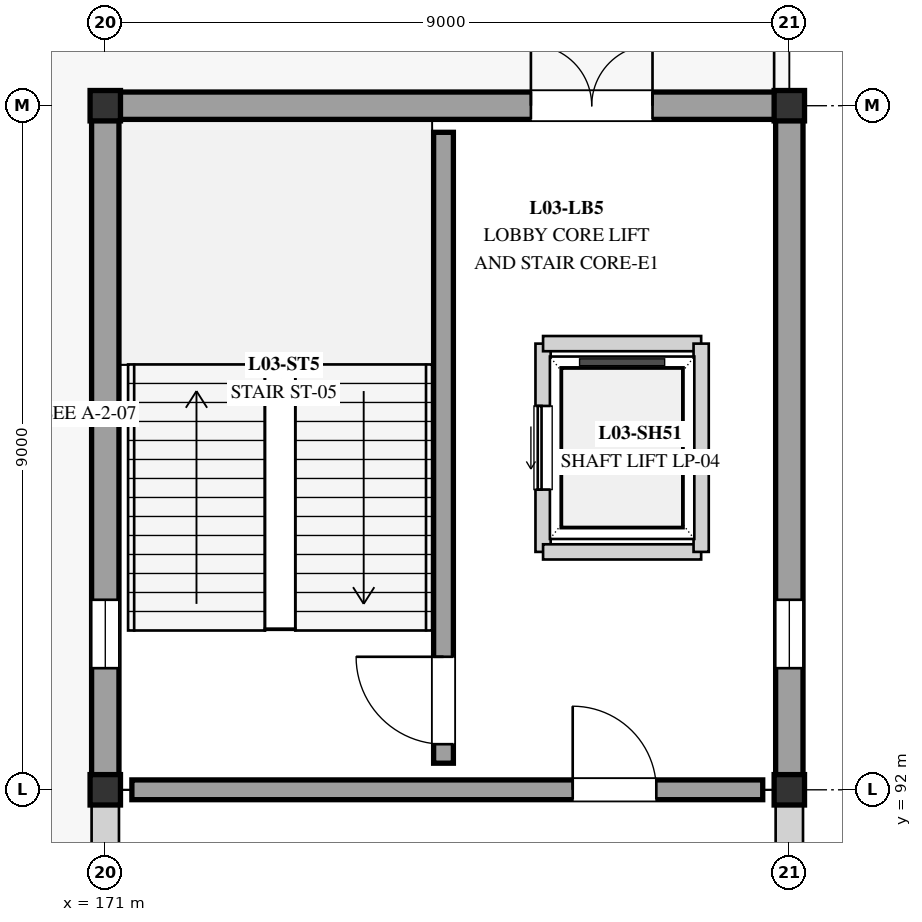
"""IFC4 building model, lengths in metres.
Left out: names, types, materials, properties, quantities, classifications, styles, units other than length and angle.
Written with IfcOpenShell. Run it as: python <this file> out.ifc"""

import sys

from ifc_helpers import new_model, si_unit, direction, frame, frame_2d, origin, origin_2d, place, context, subcontext, project, spatial, rectangle, extrude, element, fill, save


model = new_model("IFC4")
c1 = context("Model", 3, precision=1e-05, world=origin(), true_north=direction((0.0, 1.0)))
c2 = subcontext(c1, "Body", "Model", "MODEL_VIEW")
j1 = project(units=[si_unit("LENGTHUNIT", "METRE"), si_unit("PLANEANGLEUNIT", "RADIAN")], contexts=[c1])
p1 = place(None, origin())
s1 = spatial("IfcSite", under=j1, at=p1, CompositionType="ELEMENT")
p2 = place(p1, origin())
s2 = spatial("IfcBuilding", under=s1, at=p2, CompositionType="ELEMENT")
p3 = place(p2, frame((0.0, 0.0, 12.0)))
s3 = spatial("IfcBuildingStorey", under=s2, at=p3, CompositionType="ELEMENT", Elevation=12.0)
for number, where, z_axis, x_axis in (
    (1, (171.0, 92.0, 0.0), (0.0, 0.0, 1.0), (1.0, 0.0, 0.0)),
    (2, (171.0, 101.0, 0.0), (0.0, 0.0, 1.0), (1.0, 0.0, 0.0)),
    (3, (180.0, 92.0, 0.0), (0.0, 0.0, 1.0), (1.0, 0.0, 0.0)),
    (4, (180.0, 101.0, 0.0), (0.0, 0.0, 1.0), (1.0, 0.0, 0.0)),
):
    element("IfcColumn", number, at=place(p3, frame(where, z_axis=z_axis, x_axis=x_axis)), inside=s3, PredefinedType="COLUMN", context=c2, shape_type="SweptSolid", body=[
        extrude(rectangle(XDim=0.4, YDim=0.4, at=origin_2d()), origin(), (0.0, 0.0, 1.0), 4.65),
    ])
p4 = place(p3, frame((171.0, 83.0, 0.0), z_axis=(0.0, 0.0, 1.0), x_axis=(0.0, 1.0, 0.0)))
e5 = element("IfcWall", 5, at=p4, inside=s3, PredefinedType="STANDARD", context=c2, shape_type="SweptSolid", body=[
    extrude(rectangle(XDim=9.0, YDim=0.36, at=frame_2d((4.5, 0.0))), origin(), (0.0, 0.0, 1.0), 3.1),
])
p5 = place(p4, frame((3.7, 0.0, 0.0)))
e6 = element("IfcOpeningElement", 6, at=p5, cuts=e5, PredefinedType="OPENING", context=c2, shape_type="SweptSolid", body=[
    extrude(rectangle(XDim=1.6, YDim=2.3, at=frame_2d((0.8, 1.15))), frame((0.0, 0.19, 0.0), z_axis=(0.0, -1.0, 0.0), x_axis=(1.0, 0.0, 0.0)), (0.0, 0.0, 1.0), 0.38),
])
p6 = place(p3, frame((180.0, 83.0, 0.0), z_axis=(0.0, 0.0, 1.0), x_axis=(0.0, 1.0, 0.0)))
e7 = element("IfcWall", 7, at=p6, inside=s3, PredefinedType="STANDARD", context=c2, shape_type="SweptSolid", body=[
    extrude(rectangle(XDim=9.0, YDim=0.36, at=frame_2d((4.5, 0.0))), origin(), (0.0, 0.0, 1.0), 3.1),
])
p7 = place(p6, frame((3.45, 0.0, 0.72)))
e8 = element("IfcOpeningElement", 8, at=p7, cuts=e7, PredefinedType="OPENING", context=c2, shape_type="SweptSolid", body=[
    extrude(rectangle(XDim=2.1, YDim=2.2, at=frame_2d((1.05, 1.1))), frame((0.0, 0.19, 0.0), z_axis=(0.0, -1.0, 0.0), x_axis=(1.0, 0.0, 0.0)), (0.0, 0.0, 1.0), 0.38),
])
p8 = place(p3, frame((171.0, 101.0, 0.0), z_axis=(0.0, 0.0, 1.0), x_axis=(1.0, 0.0, 0.0)))
e9 = element("IfcWall", 9, at=p8, inside=s3, PredefinedType="STANDARD", context=c2, shape_type="SweptSolid", body=[
    extrude(rectangle(XDim=9.0, YDim=0.36, at=frame_2d((4.5, 0.0))), origin(), (0.0, 0.0, 1.0), 4.37),
])
p9 = place(p8, frame((5.6, 0.0, 0.0)))
e10 = element("IfcOpeningElement", 10, at=p9, cuts=e9, PredefinedType="OPENING", context=c2, shape_type="SweptSolid", body=[
    extrude(rectangle(XDim=1.6, YDim=2.3, at=frame_2d((0.8, 1.15))), frame((0.0, 0.19, 0.0), z_axis=(0.0, -1.0, 0.0), x_axis=(1.0, 0.0, 0.0)), (0.0, 0.0, 1.0), 0.38),
])
p10 = place(p3, frame((171.0, 92.0, 0.0), z_axis=(0.0, 0.0, 1.0), x_axis=(0.0, 1.0, 0.0)))
e11 = element("IfcWall", 11, at=p10, inside=s3, PredefinedType="STANDARD", context=c2, shape_type="SweptSolid", body=[
    extrude(rectangle(XDim=9.0, YDim=0.36, at=frame_2d((4.5, 0.0))), origin(), (0.0, 0.0, 1.0), 4.37),
])
p11 = place(p10, frame((1.6, 0.0, 0.85)))
e12 = element("IfcOpeningElement", 12, at=p11, cuts=e11, PredefinedType="OPENING", context=c2, shape_type="SweptSolid", body=[
    extrude(rectangle(XDim=0.9, YDim=2.4, at=frame_2d((0.45, 1.2))), frame((0.0, 0.19, 0.0), z_axis=(0.0, -1.0, 0.0), x_axis=(1.0, 0.0, 0.0)), (0.0, 0.0, 1.0), 0.38),
])
p12 = place(p3, frame((180.0, 92.0, 0.0), z_axis=(0.0, 0.0, 1.0), x_axis=(0.0, 1.0, 0.0)))
e13 = element("IfcWall", 13, at=p12, inside=s3, PredefinedType="STANDARD", context=c2, shape_type="SweptSolid", body=[
    extrude(rectangle(XDim=9.0, YDim=0.36, at=frame_2d((4.5, 0.0))), origin(), (0.0, 0.0, 1.0), 4.37),
])
p13 = place(p12, frame((1.6, 0.0, 0.85)))
e14 = element("IfcOpeningElement", 14, at=p13, cuts=e13, PredefinedType="OPENING", context=c2, shape_type="SweptSolid", body=[
    extrude(rectangle(XDim=0.9, YDim=2.4, at=frame_2d((0.45, 1.2))), frame((0.0, 0.19, 0.0), z_axis=(0.0, -1.0, 0.0), x_axis=(1.0, 0.0, 0.0)), (0.0, 0.0, 1.0), 0.38),
])
p14 = place(p3, frame((175.45, 92.35, 0.0), z_axis=(0.0, 0.0, 1.0), x_axis=(0.0, 1.0, 0.0)))
e15 = element("IfcWall", 15, at=p14, inside=s3, PredefinedType="SHEAR", context=c2, shape_type="SweptSolid", body=[
    extrude(rectangle(XDim=8.3, YDim=0.26, at=frame_2d((4.15, 0.0))), origin(), (0.0, 0.0, 1.0), 4.37),
])
p15 = place(p14, frame((0.25, 0.0, 0.0)))
e16 = element("IfcOpeningElement", 16, at=p15, cuts=e15, PredefinedType="OPENING", context=c2, shape_type="SweptSolid", body=[
    extrude(rectangle(XDim=1.15, YDim=2.15, at=frame_2d((0.575, 1.075))), frame((0.0, 0.14, 0.0), z_axis=(0.0, -1.0, 0.0), x_axis=(1.0, 0.0, 0.0)), (0.0, 0.0, 1.0), 0.28),
])
p16 = place(p3, frame((171.35, 92.0, 0.0), z_axis=(0.0, 0.0, 1.0), x_axis=(1.0, 0.0, 0.0)))
e17 = element("IfcWall", 17, at=p16, inside=s3, PredefinedType="SHEAR", context=c2, shape_type="SweptSolid", body=[
    extrude(rectangle(XDim=8.3, YDim=0.26, at=frame_2d((4.15, 0.0))), origin(), (0.0, 0.0, 1.0), 4.37),
])
p17 = place(p16, frame((5.8, 0.0, 0.0)))
e18 = element("IfcOpeningElement", 18, at=p17, cuts=e17, PredefinedType="OPENING", context=c2, shape_type="SweptSolid", body=[
    extrude(rectangle(XDim=1.1, YDim=2.1, at=frame_2d((0.55, 1.05))), frame((0.0, 0.14, 0.0), z_axis=(0.0, -1.0, 0.0), x_axis=(1.0, 0.0, 0.0)), (0.0, 0.0, 1.0), 0.28),
])
p18 = place(p3, frame((176.76, 95.13, 0.0), z_axis=(0.0, 0.0, 1.0), x_axis=(0.0, 1.0, 0.0)))
e19 = element("IfcWall", 19, at=p18, inside=s3, PredefinedType="SOLIDWALL", context=c2, shape_type="SweptSolid", body=[
    extrude(rectangle(XDim=2.74, YDim=0.2, at=frame_2d((1.37, 0.0))), origin(), (0.0, 0.0, 1.0), 2.35),
])
p19 = place(p18, frame((0.82, 0.0, 0.0)))
e20 = element("IfcOpeningElement", 20, at=p19, cuts=e19, PredefinedType="OPENING", context=c2, shape_type="SweptSolid", body=[
    extrude(rectangle(XDim=1.1, YDim=2.1, at=frame_2d((0.55, 1.05))), frame((0.0, 0.11, 0.0), z_axis=(0.0, -1.0, 0.0), x_axis=(1.0, 0.0, 0.0)), (0.0, 0.0, 1.0), 0.22),
])
for number, where, z_axis, x_axis in (
    (21, (176.76, 95.13, 0.0), (0.0, 0.0, 1.0), (1.0, 0.0, 0.0)),
    (22, (176.76, 97.87, 0.0), (0.0, 0.0, 1.0), (1.0, 0.0, 0.0)),
):
    element("IfcWall", number, at=place(p3, frame(where, z_axis=z_axis, x_axis=x_axis)), inside=s3, PredefinedType="SOLIDWALL", context=c2, shape_type="SweptSolid", body=[
        extrude(rectangle(XDim=2.08, YDim=0.2, at=frame_2d((1.04, 0.0))), origin(), (0.0, 0.0, 1.0), 2.35),
    ])
p20 = place(p3, frame((178.84, 95.13, 0.0), z_axis=(0.0, 0.0, 1.0), x_axis=(0.0, 1.0, 0.0)))
e23 = element("IfcWall", 23, at=p20, inside=s3, PredefinedType="SOLIDWALL", context=c2, shape_type="SweptSolid", body=[
    extrude(rectangle(XDim=2.74, YDim=0.2, at=frame_2d((1.37, 0.0))), origin(), (0.0, 0.0, 1.0), 2.35),
])
p21 = place(p9, origin())
e24 = element("IfcDoor", 24, at=p21, inside=s3, OperationType="DOUBLE_DOOR_SINGLE_SWING", PredefinedType="DOOR", context=c2, shape_type="SweptSolid", body=[
    extrude(rectangle(XDim=1.6, YDim=2.3, at=frame_2d((0.8, 1.15))), frame((0.0, 0.025, 0.0), z_axis=(0.0, -1.0, 0.0), x_axis=(1.0, 0.0, 0.0)), (0.0, 0.0, 1.0), 0.05),
])
fill(e10, e24)
p22 = place(p11, origin())
e25 = element("IfcWindow", 25, at=p22, inside=s3, PartitioningType="SINGLE_PANEL", PredefinedType="WINDOW", context=c2, shape_type="SweptSolid", body=[
    extrude(rectangle(XDim=0.9, YDim=2.4, at=frame_2d((0.45, 1.2))), frame((0.0, 0.03, 0.0), z_axis=(0.0, -1.0, 0.0), x_axis=(1.0, 0.0, 0.0)), (0.0, 0.0, 1.0), 0.06),
])
fill(e12, e25)
p23 = place(p13, origin())
e26 = element("IfcWindow", 26, at=p23, inside=s3, PartitioningType="SINGLE_PANEL", PredefinedType="WINDOW", context=c2, shape_type="SweptSolid", body=[
    extrude(rectangle(XDim=0.9, YDim=2.4, at=frame_2d((0.45, 1.2))), frame((0.0, 0.03, 0.0), z_axis=(0.0, -1.0, 0.0), x_axis=(1.0, 0.0, 0.0)), (0.0, 0.0, 1.0), 0.06),
])
fill(e14, e26)
p24 = place(p15, origin())
e27 = element("IfcDoor", 27, at=p24, inside=s3, OperationType="SINGLE_SWING_RIGHT", PredefinedType="DOOR", context=c2, shape_type="SweptSolid", body=[
    extrude(rectangle(XDim=1.15, YDim=2.15, at=frame_2d((0.575, 1.075))), frame((0.0, 0.025, 0.0), z_axis=(0.0, -1.0, 0.0), x_axis=(1.0, 0.0, 0.0)), (0.0, 0.0, 1.0), 0.05),
])
fill(e16, e27)
p25 = place(p17, origin())
e28 = element("IfcDoor", 28, at=p25, inside=s3, OperationType="SINGLE_SWING_LEFT", PredefinedType="DOOR", context=c2, shape_type="SweptSolid", body=[
    extrude(rectangle(XDim=1.1, YDim=2.1, at=frame_2d((0.55, 1.05))), frame((0.0, 0.025, 0.0), z_axis=(0.0, -1.0, 0.0), x_axis=(1.0, 0.0, 0.0)), (0.0, 0.0, 1.0), 0.05),
])
fill(e18, e28)
p26 = place(p19, origin())
e29 = element("IfcDoor", 29, at=p26, inside=s3, OperationType="SLIDING_TO_LEFT", PredefinedType="DOOR", context=c2, shape_type="SweptSolid", body=[
    extrude(rectangle(XDim=1.1, YDim=2.1, at=frame_2d((0.55, 1.05))), frame((0.0, 0.025, 0.0), z_axis=(0.0, -1.0, 0.0), x_axis=(1.0, 0.0, 0.0)), (0.0, 0.0, 1.0), 0.05),
])
fill(e20, e29)
save(model, sys.argv[1])
